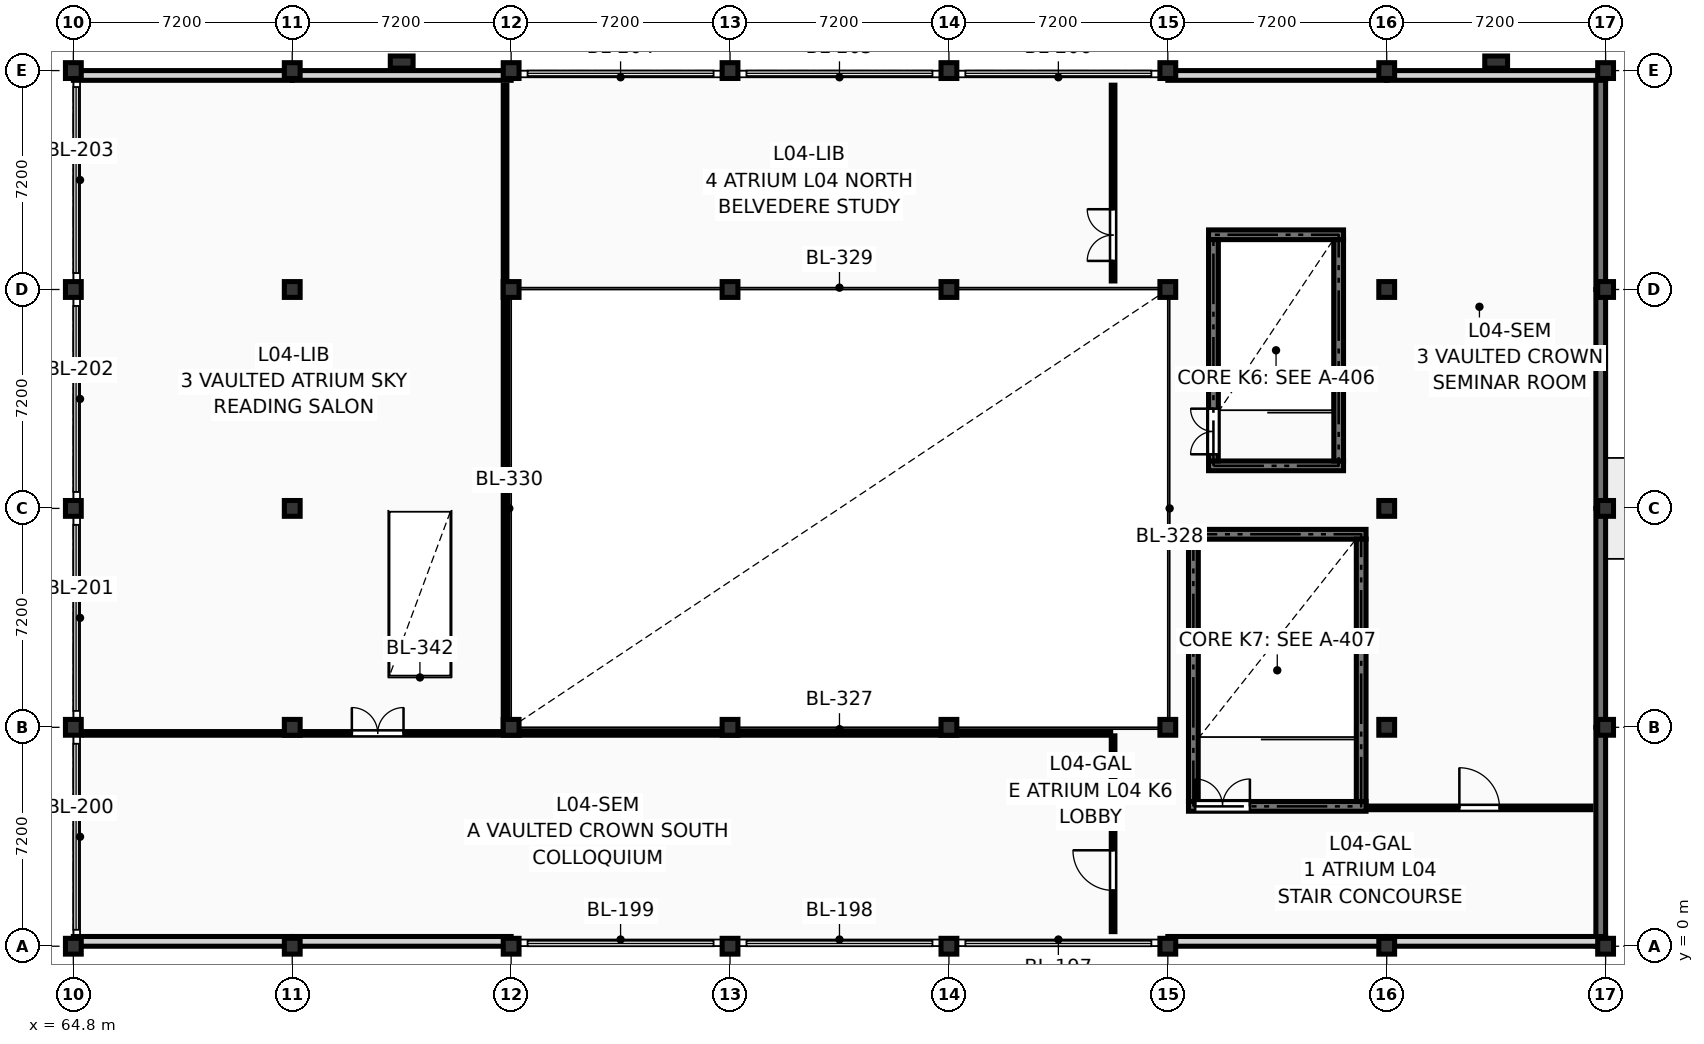
"""IFC4 building model, lengths in metres.
Left out: names, types, materials, properties, quantities, classifications, styles, units other than length and angle.
Written with IfcOpenShell. Run it as: python <this file> out.ifc"""

import sys

from ifc_helpers import new_model, si_unit, direction, frame, frame_2d, origin, origin_2d, place, context, subcontext, project, spatial, rectangle, extrude, element, fill, save


model = new_model("IFC4")
c1 = context("Model", 3, precision=1e-05, world=origin(), true_north=direction((0.0, 1.0)))
c2 = subcontext(c1, "Body", "Model", "MODEL_VIEW")
j1 = project(units=[si_unit("LENGTHUNIT", "METRE"), si_unit("PLANEANGLEUNIT", "RADIAN")], contexts=[c1])
p1 = place(None, origin())
s1 = spatial("IfcSite", under=j1, at=p1, CompositionType="ELEMENT")
p2 = place(p1, origin())
s2 = spatial("IfcBuilding", under=s1, at=p2, CompositionType="ELEMENT")
p3 = place(p2, frame((0.0, 0.0, 15.75)))
s3 = spatial("IfcBuildingStorey", under=s2, at=p3, CompositionType="ELEMENT", Elevation=15.75)
for number, where, z_axis, x_axis in (
    (1, (64.8, 0.0, 0.0), (0.0, 0.0, 1.0), (1.0, 0.0, 0.0)),
    (2, (64.8, 7.2, 0.0), (0.0, 0.0, 1.0), (1.0, 0.0, 0.0)),
    (3, (64.8, 14.4, 0.0), (0.0, 0.0, 1.0), (1.0, 0.0, 0.0)),
    (4, (64.8, 21.6, 0.0), (0.0, 0.0, 1.0), (1.0, 0.0, 0.0)),
    (5, (64.8, 28.8, 0.0), (0.0, 0.0, 1.0), (1.0, 0.0, 0.0)),
    (6, (72.0, 0.0, 0.0), (0.0, 0.0, 1.0), (1.0, 0.0, 0.0)),
    (7, (72.0, 7.2, 0.0), (0.0, 0.0, 1.0), (1.0, 0.0, 0.0)),
    (8, (72.0, 14.4, 0.0), (0.0, 0.0, 1.0), (1.0, 0.0, 0.0)),
    (9, (72.0, 21.6, 0.0), (0.0, 0.0, 1.0), (1.0, 0.0, 0.0)),
    (10, (72.0, 28.8, 0.0), (0.0, 0.0, 1.0), (1.0, 0.0, 0.0)),
    (11, (79.2, 0.0, 0.0), (0.0, 0.0, 1.0), (1.0, 0.0, 0.0)),
    (12, (79.2, 7.2, 0.0), (0.0, 0.0, 1.0), (1.0, 0.0, 0.0)),
    (13, (79.2, 21.6, 0.0), (0.0, 0.0, 1.0), (1.0, 0.0, 0.0)),
    (14, (79.2, 28.8, 0.0), (0.0, 0.0, 1.0), (1.0, 0.0, 0.0)),
    (15, (86.4, 0.0, 0.0), (0.0, 0.0, 1.0), (1.0, 0.0, 0.0)),
    (16, (86.4, 7.2, 0.0), (0.0, 0.0, 1.0), (1.0, 0.0, 0.0)),
    (17, (86.4, 21.6, 0.0), (0.0, 0.0, 1.0), (1.0, 0.0, 0.0)),
    (18, (86.4, 28.8, 0.0), (0.0, 0.0, 1.0), (1.0, 0.0, 0.0)),
    (19, (93.6, 0.0, 0.0), (0.0, 0.0, 1.0), (1.0, 0.0, 0.0)),
    (20, (93.6, 7.2, 0.0), (0.0, 0.0, 1.0), (1.0, 0.0, 0.0)),
    (21, (93.6, 21.6, 0.0), (0.0, 0.0, 1.0), (1.0, 0.0, 0.0)),
    (22, (93.6, 28.8, 0.0), (0.0, 0.0, 1.0), (1.0, 0.0, 0.0)),
    (23, (100.8, 0.0, 0.0), (0.0, 0.0, 1.0), (1.0, 0.0, 0.0)),
    (24, (100.8, 7.2, 0.0), (0.0, 0.0, 1.0), (1.0, 0.0, 0.0)),
    (25, (100.8, 21.6, 0.0), (0.0, 0.0, 1.0), (1.0, 0.0, 0.0)),
    (26, (100.8, 28.8, 0.0), (0.0, 0.0, 1.0), (1.0, 0.0, 0.0)),
    (27, (108.0, 0.0, 0.0), (0.0, 0.0, 1.0), (1.0, 0.0, 0.0)),
    (28, (108.0, 7.2, 0.0), (0.0, 0.0, 1.0), (1.0, 0.0, 0.0)),
    (29, (108.0, 14.4, 0.0), (0.0, 0.0, 1.0), (1.0, 0.0, 0.0)),
    (30, (108.0, 21.6, 0.0), (0.0, 0.0, 1.0), (1.0, 0.0, 0.0)),
    (31, (108.0, 28.8, 0.0), (0.0, 0.0, 1.0), (1.0, 0.0, 0.0)),
    (32, (115.2, 0.0, 0.0), (0.0, 0.0, 1.0), (1.0, 0.0, 0.0)),
    (33, (115.2, 7.2, 0.0), (0.0, 0.0, 1.0), (1.0, 0.0, 0.0)),
    (34, (115.2, 14.4, 0.0), (0.0, 0.0, 1.0), (1.0, 0.0, 0.0)),
    (35, (115.2, 21.6, 0.0), (0.0, 0.0, 1.0), (1.0, 0.0, 0.0)),
    (36, (115.2, 28.8, 0.0), (0.0, 0.0, 1.0), (1.0, 0.0, 0.0)),
):
    element("IfcColumn", number, at=place(p3, frame(where, z_axis=z_axis, x_axis=x_axis)), inside=s3, PredefinedType="COLUMN", context=c2, shape_type="SweptSolid", body=[
        extrude(rectangle(XDim=0.52, YDim=0.52, at=origin_2d()), origin(), (0.0, 0.0, 1.0), 3.6),
    ])
for number, where, z_axis, x_axis in (
    (37, (75.6, 29.08, 0.0), (0.0, 0.0, 1.0), (0.0, 1.0, 0.0)),
    (38, (111.6, 29.08, 0.0), (0.0, 0.0, 1.0), (0.0, 1.0, 0.0)),
):
    element("IfcColumn", number, at=place(p3, frame(where, z_axis=z_axis, x_axis=x_axis)), inside=s3, PredefinedType="PILASTER", context=c2, shape_type="SweptSolid", body=[
        extrude(rectangle(XDim=0.4, YDim=0.75, at=origin_2d()), origin(), (0.0, 0.0, 1.0), 3.6),
    ])
p4 = place(p3, frame((115.04, 21.6, 0.0), z_axis=(0.0, 0.0, 1.0), x_axis=(0.0, 1.0, 0.0)))
e39 = element("IfcWall", 39, at=p4, inside=s3, PredefinedType="SHEAR", context=c2, shape_type="SweptSolid", body=[
    extrude(rectangle(XDim=7.2, YDim=0.32, at=frame_2d((3.6, 0.0))), origin(), (0.0, 0.0, 1.0), 2.736),
])
p5 = place(p3, frame((115.04, 14.4, 0.0), z_axis=(0.0, 0.0, 1.0), x_axis=(0.0, 1.0, 0.0)))
e40 = element("IfcWall", 40, at=p5, inside=s3, PredefinedType="SHEAR", context=c2, shape_type="SweptSolid", body=[
    extrude(rectangle(XDim=7.2, YDim=0.32, at=frame_2d((3.6, 0.0))), origin(), (0.0, 0.0, 1.0), 2.84),
])
p6 = place(p3, frame((115.04, 7.2, 0.0), z_axis=(0.0, 0.0, 1.0), x_axis=(0.0, 1.0, 0.0)))
e41 = element("IfcWall", 41, at=p6, inside=s3, PredefinedType="SHEAR", context=c2, shape_type="SweptSolid", body=[
    extrude(rectangle(XDim=7.2, YDim=0.32, at=frame_2d((3.6, 0.0))), origin(), (0.0, 0.0, 1.0), 2.84),
])
p7 = place(p3, frame((115.04, 0.0, 0.0), z_axis=(0.0, 0.0, 1.0), x_axis=(0.0, 1.0, 0.0)))
e42 = element("IfcWall", 42, at=p7, inside=s3, PredefinedType="SHEAR", context=c2, shape_type="SweptSolid", body=[
    extrude(rectangle(XDim=7.2, YDim=0.32, at=frame_2d((3.6, 0.0))), origin(), (0.0, 0.0, 1.0), 2.736),
])
for number, where, z_axis, x_axis in (
    (43, (108.0, 0.16, 0.0), (0.0, 0.0, 1.0), (1.0, 0.0, 0.0)),
    (44, (100.8, 0.16, 0.0), (0.0, 0.0, 1.0), (1.0, 0.0, 0.0)),
    (45, (72.0, 0.16, 0.0), (0.0, 0.0, 1.0), (1.0, 0.0, 0.0)),
    (46, (64.8, 0.16, 0.0), (0.0, 0.0, 1.0), (1.0, 0.0, 0.0)),
    (47, (64.8, 28.64, 0.0), (0.0, 0.0, 1.0), (1.0, 0.0, 0.0)),
    (48, (72.0, 28.64, 0.0), (0.0, 0.0, 1.0), (1.0, 0.0, 0.0)),
    (49, (100.8, 28.64, 0.0), (0.0, 0.0, 1.0), (1.0, 0.0, 0.0)),
    (50, (108.0, 28.64, 0.0), (0.0, 0.0, 1.0), (1.0, 0.0, 0.0)),
):
    element("IfcWall", number, at=place(p3, frame(where, z_axis=z_axis, x_axis=x_axis)), inside=s3, PredefinedType="SOLIDWALL", context=c2, shape_type="SweptSolid", body=[
        extrude(rectangle(XDim=7.2, YDim=0.32, at=frame_2d((3.6, 0.0))), origin(), (0.0, 0.0, 1.0), 2.84),
    ])
for number, where, z_axis, x_axis in (
    (51, (102.14, 15.8, 0.0), (0.0, 0.0, 1.0), (1.0, 0.0, 0.0)),
    (52, (102.14, 23.4, 0.0), (0.0, 0.0, 1.0), (1.0, 0.0, 0.0)),
):
    element("IfcWall", number, at=place(p3, frame(where, z_axis=z_axis, x_axis=x_axis)), inside=s3, PredefinedType="SHEAR", context=c2, shape_type="SweptSolid", body=[
        extrude(rectangle(XDim=4.44, YDim=0.32, at=frame_2d((2.22, 0.0))), origin(), (0.0, 0.0, 1.0), 3.39),
    ])
p8 = place(p3, frame((102.3, 15.96, 0.0), z_axis=(0.0, 0.0, 1.0), x_axis=(0.0, 1.0, 0.0)))
e53 = element("IfcWall", 53, at=p8, inside=s3, PredefinedType="SHEAR", context=c2, shape_type="SweptSolid", body=[
    extrude(rectangle(XDim=7.28, YDim=0.32, at=frame_2d((3.64, 0.0))), origin(), (0.0, 0.0, 1.0), 3.39),
])
p9 = place(p8, frame((0.22, 0.0, 0.0)))
e54 = element("IfcOpeningElement", 54, at=p9, cuts=e53, PredefinedType="OPENING", context=c2, shape_type="SweptSolid", body=[
    extrude(rectangle(XDim=1.5, YDim=2.2, at=frame_2d((0.75, 1.1))), frame((0.0, 0.172, 0.0), z_axis=(0.0, -1.0, 0.0), x_axis=(1.0, 0.0, 0.0)), (0.0, 0.0, 1.0), 0.344),
])
p10 = place(p3, frame((106.42, 15.96, 0.0), z_axis=(0.0, 0.0, 1.0), x_axis=(0.0, 1.0, 0.0)))
e55 = element("IfcWall", 55, at=p10, inside=s3, PredefinedType="SHEAR", context=c2, shape_type="SweptSolid", body=[
    extrude(rectangle(XDim=7.28, YDim=0.32, at=frame_2d((3.64, 0.0))), origin(), (0.0, 0.0, 1.0), 3.39),
])
p11 = place(p3, frame((101.48, 4.6, 0.0), z_axis=(0.0, 0.0, 1.0), x_axis=(1.0, 0.0, 0.0)))
e56 = element("IfcWall", 56, at=p11, inside=s3, PredefinedType="SHEAR", context=c2, shape_type="SweptSolid", body=[
    extrude(rectangle(XDim=5.84, YDim=0.32, at=frame_2d((2.92, 0.0))), origin(), (0.0, 0.0, 1.0), 3.39),
])
p12 = place(p11, frame((0.22, 0.0, 0.0)))
e57 = element("IfcOpeningElement", 57, at=p12, cuts=e56, PredefinedType="OPENING", context=c2, shape_type="SweptSolid", body=[
    extrude(rectangle(XDim=1.8, YDim=2.2, at=frame_2d((0.9, 1.1))), frame((0.0, 0.172, 0.0), z_axis=(0.0, -1.0, 0.0), x_axis=(1.0, 0.0, 0.0)), (0.0, 0.0, 1.0), 0.344),
])
p13 = place(p3, frame((101.48, 13.55, 0.0), z_axis=(0.0, 0.0, 1.0), x_axis=(1.0, 0.0, 0.0)))
e58 = element("IfcWall", 58, at=p13, inside=s3, PredefinedType="SHEAR", context=c2, shape_type="SweptSolid", body=[
    extrude(rectangle(XDim=5.84, YDim=0.32, at=frame_2d((2.92, 0.0))), origin(), (0.0, 0.0, 1.0), 3.39),
])
for number, where, z_axis, x_axis in (
    (59, (101.64, 4.76, 0.0), (0.0, 0.0, 1.0), (0.0, 1.0, 0.0)),
    (60, (107.16, 4.76, 0.0), (0.0, 0.0, 1.0), (0.0, 1.0, 0.0)),
):
    element("IfcWall", number, at=place(p3, frame(where, z_axis=z_axis, x_axis=x_axis)), inside=s3, PredefinedType="SHEAR", context=c2, shape_type="SweptSolid", body=[
        extrude(rectangle(XDim=8.63, YDim=0.32, at=frame_2d((4.315, 0.0))), origin(), (0.0, 0.0, 1.0), 3.39),
    ])
p14 = place(p3, frame((99.0, 0.48, 0.0), z_axis=(0.0, 0.0, 1.0), x_axis=(0.0, 1.0, 0.0)))
e61 = element("IfcWall", 61, at=p14, inside=s3, PredefinedType="PARTITIONING", context=c2, shape_type="SweptSolid", body=[
    extrude(rectangle(XDim=6.44, YDim=0.12, at=frame_2d((3.22, 0.0))), origin(), (0.0, 0.0, 1.0), 3.375),
])
p15 = place(p14, frame((1.356, 0.0, 0.0)))
e62 = element("IfcOpeningElement", 62, at=p15, cuts=e61, PredefinedType="OPENING", context=c2, shape_type="SweptSolid", body=[
    extrude(rectangle(XDim=1.32, YDim=2.2, at=frame_2d((0.66, 1.1))), frame((0.0, 0.072, 0.0), z_axis=(0.0, -1.0, 0.0), x_axis=(1.0, 0.0, 0.0)), (0.0, 0.0, 1.0), 0.144),
])
p16 = place(p3, frame((65.18, 7.0, 0.0), z_axis=(0.0, 0.0, 1.0), x_axis=(1.0, 0.0, 0.0)))
e63 = element("IfcWall", 63, at=p16, inside=s3, PredefinedType="PARTITIONING", context=c2, shape_type="SweptSolid", body=[
    extrude(rectangle(XDim=33.74, YDim=0.12, at=frame_2d((16.87, 0.0))), origin(), (0.0, 0.0, 1.0), 2.655),
])
p17 = place(p16, frame((8.781, 0.0, 0.0)))
e64 = element("IfcOpeningElement", 64, at=p17, cuts=e63, PredefinedType="OPENING", context=c2, shape_type="SweptSolid", body=[
    extrude(rectangle(XDim=1.7, YDim=2.28, at=frame_2d((0.85, 1.14))), frame((0.0, 0.072, 0.0), z_axis=(0.0, -1.0, 0.0), x_axis=(1.0, 0.0, 0.0)), (0.0, 0.0, 1.0), 0.144),
])
p18 = place(p3, frame((79.0, 7.1, 0.0), z_axis=(0.0, 0.0, 1.0), x_axis=(0.0, 1.0, 0.0)))
e65 = element("IfcWall", 65, at=p18, inside=s3, PredefinedType="PARTITIONING", context=c2, shape_type="SweptSolid", body=[
    extrude(rectangle(XDim=21.22, YDim=0.12, at=frame_2d((10.61, 0.0))), origin(), (0.0, 0.0, 1.0), 2.655),
])
p19 = place(p3, frame((99.0, 21.88, 0.0), z_axis=(0.0, 0.0, 1.0), x_axis=(0.0, 1.0, 0.0)))
e66 = element("IfcWall", 66, at=p19, inside=s3, PredefinedType="PARTITIONING", context=c2, shape_type="SweptSolid", body=[
    extrude(rectangle(XDim=6.44, YDim=0.12, at=frame_2d((3.22, 0.0))), origin(), (0.0, 0.0, 1.0), 3.375),
])
p20 = place(p19, frame((0.66, 0.0, 0.0)))
e67 = element("IfcOpeningElement", 67, at=p20, cuts=e66, PredefinedType="OPENING", context=c2, shape_type="SweptSolid", body=[
    extrude(rectangle(XDim=1.7, YDim=2.28, at=frame_2d((0.85, 1.14))), frame((0.0, 0.072, 0.0), z_axis=(0.0, -1.0, 0.0), x_axis=(1.0, 0.0, 0.0)), (0.0, 0.0, 1.0), 0.144),
])
p21 = place(p3, frame((107.38, 4.55, 0.0), z_axis=(0.0, 0.0, 1.0), x_axis=(1.0, 0.0, 0.0)))
e68 = element("IfcWall", 68, at=p21, inside=s3, PredefinedType="PARTITIONING", context=c2, shape_type="SweptSolid", body=[
    extrude(rectangle(XDim=7.34, YDim=0.12, at=frame_2d((3.67, 0.0))), origin(), (0.0, 0.0, 1.0), 3.375),
])
p22 = place(p21, frame((3.01, 0.0, 0.0)))
e69 = element("IfcOpeningElement", 69, at=p22, cuts=e68, PredefinedType="OPENING", context=c2, shape_type="SweptSolid", body=[
    extrude(rectangle(XDim=1.32, YDim=2.2, at=frame_2d((0.66, 1.1))), frame((0.0, 0.072, 0.0), z_axis=(0.0, -1.0, 0.0), x_axis=(1.0, 0.0, 0.0)), (0.0, 0.0, 1.0), 0.144),
])
p23 = place(p9, origin())
e70 = element("IfcDoor", 70, at=p23, inside=s3, OperationType="DOUBLE_DOOR_SINGLE_SWING", PredefinedType="DOOR", context=c2, shape_type="SweptSolid", body=[
    extrude(rectangle(XDim=1.5, YDim=2.2, at=frame_2d((0.75, 1.1))), frame((0.0, 0.025, 0.0), z_axis=(0.0, -1.0, 0.0), x_axis=(1.0, 0.0, 0.0)), (0.0, 0.0, 1.0), 0.05),
])
fill(e54, e70)
p24 = place(p12, origin())
e71 = element("IfcDoor", 71, at=p24, inside=s3, OperationType="DOUBLE_DOOR_SINGLE_SWING", PredefinedType="DOOR", context=c2, shape_type="SweptSolid", body=[
    extrude(rectangle(XDim=1.8, YDim=2.2, at=frame_2d((0.9, 1.1))), frame((0.0, 0.025, 0.0), z_axis=(0.0, -1.0, 0.0), x_axis=(1.0, 0.0, 0.0)), (0.0, 0.0, 1.0), 0.05),
])
fill(e57, e71)
p25 = place(p15, origin())
e72 = element("IfcDoor", 72, at=p25, inside=s3, OperationType="SINGLE_SWING_RIGHT", PredefinedType="DOOR", context=c2, shape_type="SweptSolid", body=[
    extrude(rectangle(XDim=1.32, YDim=2.2, at=frame_2d((0.66, 1.1))), frame((0.0, 0.025, 0.0), z_axis=(0.0, -1.0, 0.0), x_axis=(1.0, 0.0, 0.0)), (0.0, 0.0, 1.0), 0.05),
])
fill(e62, e72)
p26 = place(p17, origin())
e73 = element("IfcDoor", 73, at=p26, inside=s3, OperationType="DOUBLE_DOOR_SINGLE_SWING", PredefinedType="DOOR", context=c2, shape_type="SweptSolid", body=[
    extrude(rectangle(XDim=1.7, YDim=2.28, at=frame_2d((0.85, 1.14))), frame((0.0, 0.025, 0.0), z_axis=(0.0, -1.0, 0.0), x_axis=(1.0, 0.0, 0.0)), (0.0, 0.0, 1.0), 0.05),
])
fill(e64, e73)
p27 = place(p20, origin())
e74 = element("IfcDoor", 74, at=p27, inside=s3, OperationType="DOUBLE_DOOR_SINGLE_SWING", PredefinedType="DOOR", context=c2, shape_type="SweptSolid", body=[
    extrude(rectangle(XDim=1.7, YDim=2.28, at=frame_2d((0.85, 1.14))), frame((0.0, 0.025, 0.0), z_axis=(0.0, -1.0, 0.0), x_axis=(1.0, 0.0, 0.0)), (0.0, 0.0, 1.0), 0.05),
])
fill(e67, e74)
p28 = place(p22, origin())
e75 = element("IfcDoor", 75, at=p28, inside=s3, OperationType="SINGLE_SWING_LEFT", PredefinedType="DOOR", context=c2, shape_type="SweptSolid", body=[
    extrude(rectangle(XDim=1.32, YDim=2.2, at=frame_2d((0.66, 1.1))), frame((0.0, 0.025, 0.0), z_axis=(0.0, -1.0, 0.0), x_axis=(1.0, 0.0, 0.0)), (0.0, 0.0, 1.0), 0.05),
])
fill(e69, e75)
save(model, sys.argv[1])
